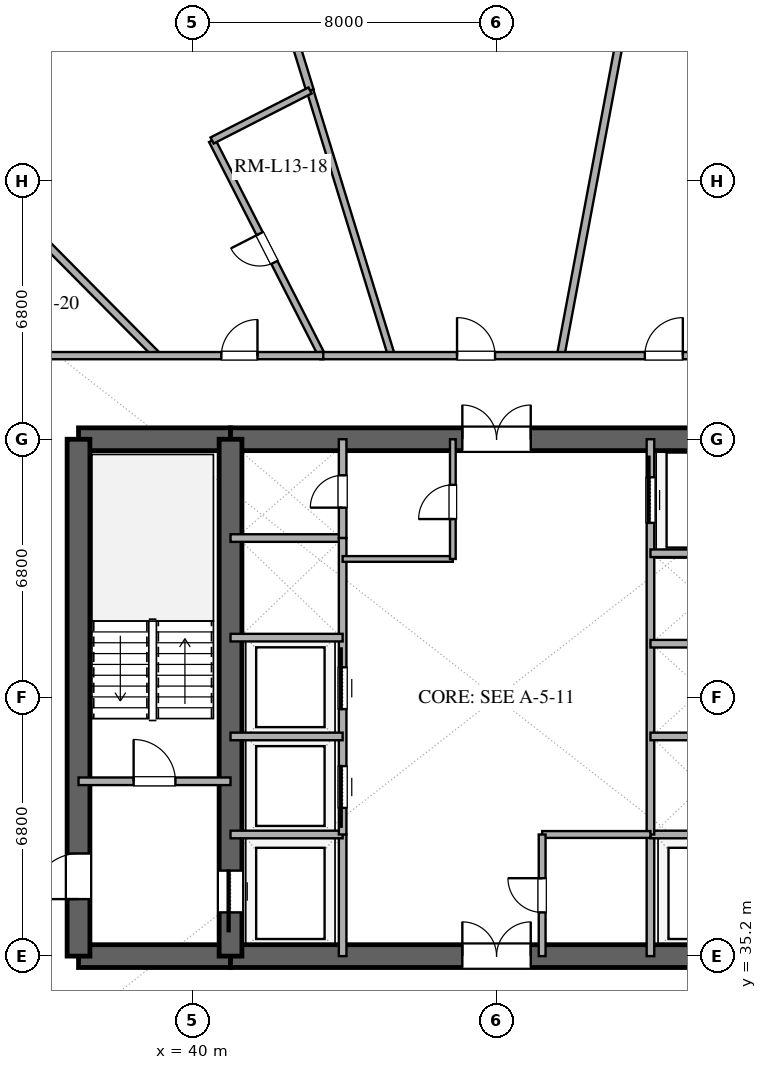
"""IFC4 building model, lengths in metres.
Left out: names, types, materials, properties, quantities, classifications, styles, units other than length and angle.
Written with IfcOpenShell. Run it as: python <this file> out.ifc"""

import sys

from ifc_helpers import new_model, si_unit, direction, frame, frame_2d, origin, place, context, subcontext, project, spatial, rectangle, extrude, element, fill, save


model = new_model("IFC4")
c1 = context("Model", 3, precision=1e-05, world=origin(), true_north=direction((0.0, 1.0)))
c2 = subcontext(c1, "Body", "Model", "MODEL_VIEW")
j1 = project(units=[si_unit("LENGTHUNIT", "METRE"), si_unit("PLANEANGLEUNIT", "RADIAN")], contexts=[c1])
p1 = place(None, origin())
s1 = spatial("IfcSite", under=j1, at=p1, CompositionType="ELEMENT")
p2 = place(p1, origin())
s2 = spatial("IfcBuilding", under=s1, at=p2, CompositionType="ELEMENT")
p3 = place(p2, frame((0.0, 0.0, 57.0)))
s3 = spatial("IfcBuildingStorey", under=s2, at=p3, CompositionType="ELEMENT", Elevation=57.0)
p4 = place(p3, frame((37.0, 35.2, 0.0), z_axis=(0.0, 0.0, 1.0), x_axis=(1.0, 0.0, 0.0)))
e1 = element("IfcWall", 1, at=p4, inside=s3, PredefinedType="SHEAR", context=c2, shape_type="SweptSolid", body=[
    extrude(rectangle(XDim=4.0, YDim=0.6, at=frame_2d((2.0, 0.0))), origin(), (0.0, 0.0, 1.0), 3.38),
])
p5 = place(p3, frame((41.0, 35.2, 0.0), z_axis=(0.0, 0.0, 1.0), x_axis=(1.0, 0.0, 0.0)))
e2 = element("IfcWall", 2, at=p5, inside=s3, PredefinedType="SHEAR", context=c2, shape_type="SweptSolid", body=[
    extrude(rectangle(XDim=14.0, YDim=0.6, at=frame_2d((7.0, 0.0))), origin(), (0.0, 0.0, 1.0), 3.38),
])
p6 = place(p5, frame((6.1, 0.0, 0.0)))
e3 = element("IfcOpeningElement", 3, at=p6, cuts=e2, PredefinedType="OPENING", context=c2, shape_type="SweptSolid", body=[
    extrude(rectangle(XDim=1.8, YDim=2.25, at=frame_2d((0.9, 1.125))), frame((0.0, 0.31, 0.0), z_axis=(0.0, -1.0, 0.0), x_axis=(1.0, 0.0, 0.0)), (0.0, 0.0, 1.0), 0.62),
])
p7 = place(p3, frame((37.0, 48.8, 0.0), z_axis=(0.0, 0.0, 1.0), x_axis=(1.0, 0.0, 0.0)))
e4 = element("IfcWall", 4, at=p7, inside=s3, PredefinedType="SHEAR", context=c2, shape_type="SweptSolid", body=[
    extrude(rectangle(XDim=4.0, YDim=0.6, at=frame_2d((2.0, 0.0))), origin(), (0.0, 0.0, 1.0), 3.38),
])
p8 = place(p3, frame((41.0, 48.8, 0.0), z_axis=(0.0, 0.0, 1.0), x_axis=(1.0, 0.0, 0.0)))
e5 = element("IfcWall", 5, at=p8, inside=s3, PredefinedType="SHEAR", context=c2, shape_type="SweptSolid", body=[
    extrude(rectangle(XDim=14.0, YDim=0.6, at=frame_2d((7.0, 0.0))), origin(), (0.0, 0.0, 1.0), 3.38),
])
p9 = place(p8, frame((6.1, 0.0, 0.0)))
e6 = element("IfcOpeningElement", 6, at=p9, cuts=e5, PredefinedType="OPENING", context=c2, shape_type="SweptSolid", body=[
    extrude(rectangle(XDim=1.8, YDim=2.25, at=frame_2d((0.9, 1.125))), frame((0.0, 0.31, 0.0), z_axis=(0.0, -1.0, 0.0), x_axis=(1.0, 0.0, 0.0)), (0.0, 0.0, 1.0), 0.62),
])
p10 = place(p3, frame((37.0, 35.2, 0.0), z_axis=(0.0, 0.0, 1.0), x_axis=(0.0, 1.0, 0.0)))
e7 = element("IfcWall", 7, at=p10, inside=s3, PredefinedType="SHEAR", context=c2, shape_type="SweptSolid", body=[
    extrude(rectangle(XDim=13.6, YDim=0.6, at=frame_2d((6.8, 0.0))), origin(), (0.0, 0.0, 1.0), 3.38),
])
p11 = place(p10, frame((1.5, 0.0, 0.0)))
e8 = element("IfcOpeningElement", 8, at=p11, cuts=e7, PredefinedType="OPENING", context=c2, shape_type="SweptSolid", body=[
    extrude(rectangle(XDim=1.2, YDim=2.15, at=frame_2d((0.6, 1.075))), frame((0.0, 0.31, 0.0), z_axis=(0.0, -1.0, 0.0), x_axis=(1.0, 0.0, 0.0)), (0.0, 0.0, 1.0), 0.62),
])
p12 = place(p3, frame((41.0, 35.2, 0.0), z_axis=(0.0, 0.0, 1.0), x_axis=(0.0, 1.0, 0.0)))
e9 = element("IfcWall", 9, at=p12, inside=s3, PredefinedType="SHEAR", context=c2, shape_type="SweptSolid", body=[
    extrude(rectangle(XDim=13.6, YDim=0.6, at=frame_2d((6.8, 0.0))), origin(), (0.0, 0.0, 1.0), 3.38),
])
p13 = place(p12, frame((1.15, 0.0, 0.0)))
e10 = element("IfcOpeningElement", 10, at=p13, cuts=e9, PredefinedType="OPENING", context=c2, shape_type="SweptSolid", body=[
    extrude(rectangle(XDim=1.1, YDim=2.2, at=frame_2d((0.55, 1.1))), frame((0.0, 0.31, 0.0), z_axis=(0.0, -1.0, 0.0), x_axis=(1.0, 0.0, 0.0)), (0.0, 0.0, 1.0), 0.62),
])
p14 = place(p3, frame((37.0, 39.8, 0.0), z_axis=(0.0, 0.0, 1.0), x_axis=(1.0, 0.0, 0.0)))
e11 = element("IfcWall", 11, at=p14, inside=s3, PredefinedType="SOLIDWALL", context=c2, shape_type="SweptSolid", body=[
    extrude(rectangle(XDim=4.0, YDim=0.2, at=frame_2d((2.0, 0.0))), origin(), (0.0, 0.0, 1.0), 2.74),
])
p15 = place(p14, frame((1.45, 0.0, 0.0)))
e12 = element("IfcOpeningElement", 12, at=p15, cuts=e11, PredefinedType="OPENING", context=c2, shape_type="SweptSolid", body=[
    extrude(rectangle(XDim=1.1, YDim=2.15, at=frame_2d((0.55, 1.075))), frame((0.0, 0.11, 0.0), z_axis=(0.0, -1.0, 0.0), x_axis=(1.0, 0.0, 0.0)), (0.0, 0.0, 1.0), 0.22),
])
p16 = place(p3, frame((43.95, 35.2, 0.0), z_axis=(0.0, 0.0, 1.0), x_axis=(0.0, 1.0, 0.0)))
e13 = element("IfcWall", 13, at=p16, inside=s3, PredefinedType="SOLIDWALL", context=c2, shape_type="SweptSolid", body=[
    extrude(rectangle(XDim=3.2, YDim=0.2, at=frame_2d((1.6, 0.0))), origin(), (0.0, 0.0, 1.0), 2.74),
])
p17 = place(p3, frame((41.0, 38.4, 0.0), z_axis=(0.0, 0.0, 1.0), x_axis=(1.0, 0.0, 0.0)))
e14 = element("IfcWall", 14, at=p17, inside=s3, PredefinedType="SOLIDWALL", context=c2, shape_type="SweptSolid", body=[
    extrude(rectangle(XDim=2.95, YDim=0.2, at=frame_2d((1.475, 0.0))), origin(), (0.0, 0.0, 1.0), 2.74),
])
p18 = place(p3, frame((52.05, 35.2, 0.0), z_axis=(0.0, 0.0, 1.0), x_axis=(0.0, 1.0, 0.0)))
e15 = element("IfcWall", 15, at=p18, inside=s3, PredefinedType="SOLIDWALL", context=c2, shape_type="SweptSolid", body=[
    extrude(rectangle(XDim=3.2, YDim=0.2, at=frame_2d((1.6, 0.0))), origin(), (0.0, 0.0, 1.0), 2.74),
])
for number, where, z_axis, x_axis in (
    (16, (52.05, 38.4, 0.0), (0.0, 0.0, 1.0), (1.0, 0.0, 0.0)),
    (17, (41.0, 46.2, 0.0), (0.0, 0.0, 1.0), (1.0, 0.0, 0.0)),
):
    element("IfcWall", number, at=place(p3, frame(where, z_axis=z_axis, x_axis=x_axis)), inside=s3, PredefinedType="SOLIDWALL", context=c2, shape_type="SweptSolid", body=[
        extrude(rectangle(XDim=2.95, YDim=0.2, at=frame_2d((1.475, 0.0))), origin(), (0.0, 0.0, 1.0), 2.74),
    ])
p19 = place(p3, frame((43.95, 46.2, 0.0), z_axis=(0.0, 0.0, 1.0), x_axis=(0.0, 1.0, 0.0)))
e18 = element("IfcWall", 18, at=p19, inside=s3, PredefinedType="SOLIDWALL", context=c2, shape_type="SweptSolid", body=[
    extrude(rectangle(XDim=2.6, YDim=0.2, at=frame_2d((1.3, 0.0))), origin(), (0.0, 0.0, 1.0), 2.74),
])
p20 = place(p19, frame((0.8, 0.0, 0.0)))
e19 = element("IfcOpeningElement", 19, at=p20, cuts=e18, PredefinedType="OPENING", context=c2, shape_type="SweptSolid", body=[
    extrude(rectangle(XDim=0.85, YDim=2.15, at=frame_2d((0.425, 1.075))), frame((0.0, 0.11, 0.0), z_axis=(0.0, -1.0, 0.0), x_axis=(1.0, 0.0, 0.0)), (0.0, 0.0, 1.0), 0.22),
])
p21 = place(p3, frame((43.95, 38.4, 0.0), z_axis=(0.0, 0.0, 1.0), x_axis=(0.0, 1.0, 0.0)))
e20 = element("IfcWall", 20, at=p21, inside=s3, PredefinedType="SOLIDWALL", context=c2, shape_type="SweptSolid", body=[
    extrude(rectangle(XDim=7.8, YDim=0.2, at=frame_2d((3.9, 0.0))), origin(), (0.0, 0.0, 1.0), 2.74),
])
p22 = place(p21, frame((0.7, 0.0, 0.0)))
e21 = element("IfcOpeningElement", 21, at=p22, cuts=e20, PredefinedType="OPENING", context=c2, shape_type="SweptSolid", body=[
    extrude(rectangle(XDim=1.1, YDim=2.2, at=frame_2d((0.55, 1.1))), frame((0.0, 0.11, 0.0), z_axis=(0.0, -1.0, 0.0), x_axis=(1.0, 0.0, 0.0)), (0.0, 0.0, 1.0), 0.22),
])
p23 = place(p21, frame((3.3, 0.0, 0.0)))
e22 = element("IfcOpeningElement", 22, at=p23, cuts=e20, PredefinedType="OPENING", context=c2, shape_type="SweptSolid", body=[
    extrude(rectangle(XDim=1.1, YDim=2.2, at=frame_2d((0.55, 1.1))), frame((0.0, 0.11, 0.0), z_axis=(0.0, -1.0, 0.0), x_axis=(1.0, 0.0, 0.0)), (0.0, 0.0, 1.0), 0.22),
])
for number, where, z_axis, x_axis in (
    (23, (41.0, 40.98, 0.0), (0.0, 0.0, 1.0), (1.0, 0.0, 0.0)),
    (24, (41.0, 43.58, 0.0), (0.0, 0.0, 1.0), (1.0, 0.0, 0.0)),
):
    element("IfcWall", number, at=place(p3, frame(where, z_axis=z_axis, x_axis=x_axis)), inside=s3, PredefinedType="SOLIDWALL", context=c2, shape_type="SweptSolid", body=[
        extrude(rectangle(XDim=2.95, YDim=0.2, at=frame_2d((1.475, 0.0))), origin(), (0.0, 0.0, 1.0), 2.74),
    ])
p24 = place(p3, frame((52.05, 38.4, 0.0), z_axis=(0.0, 0.0, 1.0), x_axis=(0.0, 1.0, 0.0)))
e25 = element("IfcWall", 25, at=p24, inside=s3, PredefinedType="SOLIDWALL", context=c2, shape_type="SweptSolid", body=[
    extrude(rectangle(XDim=10.4, YDim=0.2, at=frame_2d((5.2, 0.0))), origin(), (0.0, 0.0, 1.0), 2.74),
])
p25 = place(p24, frame((8.2, 0.0, 0.0)))
e26 = element("IfcOpeningElement", 26, at=p25, cuts=e25, PredefinedType="OPENING", context=c2, shape_type="SweptSolid", body=[
    extrude(rectangle(XDim=1.2, YDim=2.2, at=frame_2d((0.6, 1.1))), frame((0.0, 0.11, 0.0), z_axis=(0.0, -1.0, 0.0), x_axis=(1.0, 0.0, 0.0)), (0.0, 0.0, 1.0), 0.22),
])
for number, where, z_axis, x_axis in (
    (27, (52.05, 40.98, 0.0), (0.0, 0.0, 1.0), (1.0, 0.0, 0.0)),
    (28, (52.05, 43.42, 0.0), (0.0, 0.0, 1.0), (1.0, 0.0, 0.0)),
    (29, (52.05, 45.8, 0.0), (0.0, 0.0, 1.0), (1.0, 0.0, 0.0)),
):
    element("IfcWall", number, at=place(p3, frame(where, z_axis=z_axis, x_axis=x_axis)), inside=s3, PredefinedType="SOLIDWALL", context=c2, shape_type="SweptSolid", body=[
        extrude(rectangle(XDim=2.95, YDim=0.2, at=frame_2d((1.475, 0.0))), origin(), (0.0, 0.0, 1.0), 2.74),
    ])
p26 = place(p3, frame((43.95, 45.65, 0.0), z_axis=(0.0, 0.0, 1.0), x_axis=(1.0, 0.0, 0.0)))
e30 = element("IfcWall", 30, at=p26, inside=s3, PredefinedType="PARTITIONING", context=c2, shape_type="SweptSolid", body=[
    extrude(rectangle(XDim=2.9, YDim=0.15, at=frame_2d((1.45, 0.0))), origin(), (0.0, 0.0, 1.0), 2.74),
])
p27 = place(p3, frame((46.85, 45.65, 0.0), z_axis=(0.0, 0.0, 1.0), x_axis=(0.0, 1.0, 0.0)))
e31 = element("IfcWall", 31, at=p27, inside=s3, PredefinedType="PARTITIONING", context=c2, shape_type="SweptSolid", body=[
    extrude(rectangle(XDim=3.15, YDim=0.15, at=frame_2d((1.575, 0.0))), origin(), (0.0, 0.0, 1.0), 2.74),
])
p28 = place(p27, frame((1.05, 0.0, 0.0)))
e32 = element("IfcOpeningElement", 32, at=p28, cuts=e31, PredefinedType="OPENING", context=c2, shape_type="SweptSolid", body=[
    extrude(rectangle(XDim=0.9, YDim=2.15, at=frame_2d((0.45, 1.075))), frame((0.0, 0.085, 0.0), z_axis=(0.0, -1.0, 0.0), x_axis=(1.0, 0.0, 0.0)), (0.0, 0.0, 1.0), 0.17),
])
p29 = place(p3, frame((49.2, 38.4, 0.0), z_axis=(0.0, 0.0, 1.0), x_axis=(1.0, 0.0, 0.0)))
e33 = element("IfcWall", 33, at=p29, inside=s3, PredefinedType="PLUMBINGWALL", context=c2, shape_type="SweptSolid", body=[
    extrude(rectangle(XDim=2.85, YDim=0.18, at=frame_2d((1.425, 0.0))), origin(), (0.0, 0.0, 1.0), 2.74),
])
p30 = place(p3, frame((49.2, 35.2, 0.0), z_axis=(0.0, 0.0, 1.0), x_axis=(0.0, 1.0, 0.0)))
e34 = element("IfcWall", 34, at=p30, inside=s3, PredefinedType="PLUMBINGWALL", context=c2, shape_type="SweptSolid", body=[
    extrude(rectangle(XDim=3.2, YDim=0.18, at=frame_2d((1.6, 0.0))), origin(), (0.0, 0.0, 1.0), 2.74),
])
p31 = place(p30, frame((1.15, 0.0, 0.0)))
e35 = element("IfcOpeningElement", 35, at=p31, cuts=e34, PredefinedType="OPENING", context=c2, shape_type="SweptSolid", body=[
    extrude(rectangle(XDim=0.9, YDim=2.1, at=frame_2d((0.45, 1.05))), frame((0.0, 0.1, 0.0), z_axis=(0.0, -1.0, 0.0), x_axis=(1.0, 0.0, 0.0)), (0.0, 0.0, 1.0), 0.2),
])
p32 = place(p3, frame((52.375, 65.343, 0.0), z_axis=(0.0, 0.0, 1.0), x_axis=(-0.184219844734, -0.982885063884, 0.0)))
e36 = element("IfcWall", 36, at=p32, inside=s3, PredefinedType="PARTITIONING", context=c2, shape_type="SweptSolid", body=[
    extrude(rectangle(XDim=14.593, YDim=0.2, at=frame_2d((7.296, 0.0))), origin(), (0.0, 0.0, 1.0), 2.74),
])
p33 = place(p3, frame((43.092, 57.976, 0.0), z_axis=(0.0, 0.0, 1.0), x_axis=(0.293648581073, -0.95591344317, 0.0)))
e37 = element("IfcWall", 37, at=p33, inside=s3, PredefinedType="PLUMBINGWALL", context=c2, shape_type="SweptSolid", body=[
    extrude(rectangle(XDim=7.298, YDim=0.18, at=frame_2d((3.649, 0.0))), origin(), (0.0, 0.0, 1.0), 2.74),
])
p34 = place(p3, frame((40.953, 64.939, 0.0), z_axis=(0.0, 0.0, 1.0), x_axis=(0.293635973675, -0.955917315966, 0.0)))
e38 = element("IfcWall", 38, at=p34, inside=s3, PredefinedType="PARTITIONING", context=c2, shape_type="SweptSolid", body=[
    extrude(rectangle(XDim=7.284, YDim=0.2, at=frame_2d((3.642, 0.0))), origin(), (0.0, 0.0, 1.0), 2.74),
])
p35 = place(p3, frame((39.072, 51.0, 0.0), z_axis=(0.0, 0.0, 1.0), x_axis=(-0.704257683765, 0.70994444491, 0.0)))
e39 = element("IfcWall", 39, at=p35, inside=s3, PredefinedType="PARTITIONING", context=c2, shape_type="SweptSolid", body=[
    extrude(rectangle(XDim=13.824, YDim=0.2, at=frame_2d((6.912, 0.0))), origin(), (0.0, 0.0, 1.0), 2.74),
])
p36 = place(p3, frame((43.405, 51.0, 0.0), z_axis=(0.0, 0.0, 1.0), x_axis=(-0.454680565764, 0.890654581259, 0.0)))
e40 = element("IfcWall", 40, at=p36, inside=s3, PredefinedType="PLUMBINGWALL", context=c2, shape_type="SweptSolid", body=[
    extrude(rectangle(XDim=6.356, YDim=0.18, at=frame_2d((3.178, 0.0))), origin(), (0.0, 0.0, 1.0), 2.74),
])
p37 = place(p36, frame((2.753, 0.0, 0.0)))
e41 = element("IfcOpeningElement", 41, at=p37, cuts=e40, PredefinedType="OPENING", context=c2, shape_type="SweptSolid", body=[
    extrude(rectangle(XDim=0.85, YDim=2.1, at=frame_2d((0.425, 1.05))), frame((0.0, 0.1, 0.0), z_axis=(0.0, -1.0, 0.0), x_axis=(1.0, 0.0, 0.0)), (0.0, 0.0, 1.0), 0.2),
])
p38 = place(p3, frame((43.369, 51.0, 0.0), z_axis=(0.0, 0.0, 1.0), x_axis=(1.0, 0.0, 0.0)))
e42 = element("IfcWall", 42, at=p38, inside=s3, PredefinedType="PARTITIONING", context=c2, shape_type="SweptSolid", body=[
    extrude(rectangle(XDim=17.831, YDim=0.19, at=frame_2d((8.916, 0.0))), origin(), (0.0, 0.0, 1.0), 2.74),
])
p39 = place(p38, frame((14.29, 0.0, 0.0)))
e43 = element("IfcOpeningElement", 43, at=p39, cuts=e42, PredefinedType="OPENING", context=c2, shape_type="SweptSolid", body=[
    extrude(rectangle(XDim=0.95, YDim=2.15, at=frame_2d((0.475, 1.075))), frame((0.0, 0.105, 0.0), z_axis=(0.0, -1.0, 0.0), x_axis=(1.0, 0.0, 0.0)), (0.0, 0.0, 1.0), 0.21),
])
p40 = place(p38, frame((8.533, 0.0, 0.0)))
e44 = element("IfcOpeningElement", 44, at=p40, cuts=e42, PredefinedType="OPENING", context=c2, shape_type="SweptSolid", body=[
    extrude(rectangle(XDim=1.0, YDim=2.2, at=frame_2d((0.5, 1.1))), frame((0.0, 0.105, 0.0), z_axis=(0.0, -1.0, 0.0), x_axis=(1.0, 0.0, 0.0)), (0.0, 0.0, 1.0), 0.21),
])
p41 = place(p38, frame((3.591, 0.0, 0.0)))
e45 = element("IfcOpeningElement", 45, at=p41, cuts=e42, PredefinedType="OPENING", context=c2, shape_type="SweptSolid", body=[
    extrude(rectangle(XDim=1.0, YDim=2.2, at=frame_2d((0.5, 1.1))), frame((0.0, 0.105, 0.0), z_axis=(0.0, -1.0, 0.0), x_axis=(1.0, 0.0, 0.0)), (0.0, 0.0, 1.0), 0.21),
])
p42 = place(p3, frame((34.8, 51.0, 0.0), z_axis=(0.0, 0.0, 1.0), x_axis=(1.0, 0.0, 0.0)))
e46 = element("IfcWall", 46, at=p42, inside=s3, PredefinedType="PARTITIONING", context=c2, shape_type="SweptSolid", body=[
    extrude(rectangle(XDim=8.641, YDim=0.19, at=frame_2d((4.32, 0.0))), origin(), (0.0, 0.0, 1.0), 2.74),
])
p43 = place(p42, frame((5.959, 0.0, 0.0)))
e47 = element("IfcOpeningElement", 47, at=p43, cuts=e46, PredefinedType="OPENING", context=c2, shape_type="SweptSolid", body=[
    extrude(rectangle(XDim=0.95, YDim=2.15, at=frame_2d((0.475, 1.075))), frame((0.0, 0.105, 0.0), z_axis=(0.0, -1.0, 0.0), x_axis=(1.0, 0.0, 0.0)), (0.0, 0.0, 1.0), 0.21),
])
p44 = place(p3, frame((40.515, 56.661, 0.0), z_axis=(0.0, 0.0, 1.0), x_axis=(0.890666340124, 0.454657531083, 0.0)))
e48 = element("IfcWall", 48, at=p44, inside=s3, PredefinedType="PLUMBINGWALL", context=c2, shape_type="SweptSolid", body=[
    extrude(rectangle(XDim=2.893, YDim=0.18, at=frame_2d((1.447, 0.0))), origin(), (0.0, 0.0, 1.0), 2.74),
])
p45 = place(p13, origin())
e49 = element("IfcDoor", 49, at=p45, inside=s3, OperationType="SLIDING_TO_LEFT", PredefinedType="DOOR", context=c2, shape_type="SweptSolid", body=[
    extrude(rectangle(XDim=1.1, YDim=2.2, at=frame_2d((0.55, 1.1))), frame((0.0, 0.025, 0.0), z_axis=(0.0, -1.0, 0.0), x_axis=(1.0, 0.0, 0.0)), (0.0, 0.0, 1.0), 0.05),
])
fill(e10, e49)
p46 = place(p11, origin())
e50 = element("IfcDoor", 50, at=p46, inside=s3, OperationType="SINGLE_SWING_LEFT", PredefinedType="DOOR", context=c2, shape_type="SweptSolid", body=[
    extrude(rectangle(XDim=1.2, YDim=2.15, at=frame_2d((0.6, 1.075))), frame((0.0, 0.025, 0.0), z_axis=(0.0, -1.0, 0.0), x_axis=(1.0, 0.0, 0.0)), (0.0, 0.0, 1.0), 0.05),
])
fill(e8, e50)
p47 = place(p6, origin())
e51 = element("IfcDoor", 51, at=p47, inside=s3, OperationType="DOUBLE_DOOR_SINGLE_SWING", PredefinedType="DOOR", context=c2, shape_type="SweptSolid", body=[
    extrude(rectangle(XDim=1.8, YDim=2.25, at=frame_2d((0.9, 1.125))), frame((0.0, 0.025, 0.0), z_axis=(0.0, -1.0, 0.0), x_axis=(1.0, 0.0, 0.0)), (0.0, 0.0, 1.0), 0.05),
])
fill(e3, e51)
p48 = place(p9, origin())
e52 = element("IfcDoor", 52, at=p48, inside=s3, OperationType="DOUBLE_DOOR_SINGLE_SWING", PredefinedType="DOOR", context=c2, shape_type="SweptSolid", body=[
    extrude(rectangle(XDim=1.8, YDim=2.25, at=frame_2d((0.9, 1.125))), frame((0.0, 0.025, 0.0), z_axis=(0.0, -1.0, 0.0), x_axis=(1.0, 0.0, 0.0)), (0.0, 0.0, 1.0), 0.05),
])
fill(e6, e52)
p49 = place(p15, origin())
e53 = element("IfcDoor", 53, at=p49, inside=s3, OperationType="SINGLE_SWING_LEFT", PredefinedType="DOOR", context=c2, shape_type="SweptSolid", body=[
    extrude(rectangle(XDim=1.1, YDim=2.15, at=frame_2d((0.55, 1.075))), frame((0.0, 0.025, 0.0), z_axis=(0.0, -1.0, 0.0), x_axis=(1.0, 0.0, 0.0)), (0.0, 0.0, 1.0), 0.05),
])
fill(e12, e53)
p50 = place(p20, origin())
e54 = element("IfcDoor", 54, at=p50, inside=s3, OperationType="SINGLE_SWING_LEFT", PredefinedType="DOOR", context=c2, shape_type="SweptSolid", body=[
    extrude(rectangle(XDim=0.85, YDim=2.15, at=frame_2d((0.425, 1.075))), frame((0.0, 0.025, 0.0), z_axis=(0.0, -1.0, 0.0), x_axis=(1.0, 0.0, 0.0)), (0.0, 0.0, 1.0), 0.05),
])
fill(e19, e54)
p51 = place(p22, origin())
e55 = element("IfcDoor", 55, at=p51, inside=s3, OperationType="SLIDING_TO_LEFT", PredefinedType="DOOR", context=c2, shape_type="SweptSolid", body=[
    extrude(rectangle(XDim=1.1, YDim=2.2, at=frame_2d((0.55, 1.1))), frame((0.0, 0.025, 0.0), z_axis=(0.0, -1.0, 0.0), x_axis=(1.0, 0.0, 0.0)), (0.0, 0.0, 1.0), 0.05),
])
fill(e21, e55)
p52 = place(p23, origin())
e56 = element("IfcDoor", 56, at=p52, inside=s3, OperationType="SLIDING_TO_RIGHT", PredefinedType="DOOR", context=c2, shape_type="SweptSolid", body=[
    extrude(rectangle(XDim=1.1, YDim=2.2, at=frame_2d((0.55, 1.1))), frame((0.0, 0.025, 0.0), z_axis=(0.0, -1.0, 0.0), x_axis=(1.0, 0.0, 0.0)), (0.0, 0.0, 1.0), 0.05),
])
fill(e22, e56)
p53 = place(p25, origin())
e57 = element("IfcDoor", 57, at=p53, inside=s3, OperationType="SLIDING_TO_RIGHT", PredefinedType="DOOR", context=c2, shape_type="SweptSolid", body=[
    extrude(rectangle(XDim=1.2, YDim=2.2, at=frame_2d((0.6, 1.1))), frame((0.0, 0.025, 0.0), z_axis=(0.0, -1.0, 0.0), x_axis=(1.0, 0.0, 0.0)), (0.0, 0.0, 1.0), 0.05),
])
fill(e26, e57)
p54 = place(p28, origin())
e58 = element("IfcDoor", 58, at=p54, inside=s3, OperationType="SINGLE_SWING_LEFT", PredefinedType="DOOR", context=c2, shape_type="SweptSolid", body=[
    extrude(rectangle(XDim=0.9, YDim=2.15, at=frame_2d((0.45, 1.075))), frame((0.0, 0.025, 0.0), z_axis=(0.0, -1.0, 0.0), x_axis=(1.0, 0.0, 0.0)), (0.0, 0.0, 1.0), 0.05),
])
fill(e32, e58)
p55 = place(p31, origin())
e59 = element("IfcDoor", 59, at=p55, inside=s3, OperationType="SINGLE_SWING_RIGHT", PredefinedType="DOOR", context=c2, shape_type="SweptSolid", body=[
    extrude(rectangle(XDim=0.9, YDim=2.1, at=frame_2d((0.45, 1.05))), frame((0.0, 0.025, 0.0), z_axis=(0.0, -1.0, 0.0), x_axis=(1.0, 0.0, 0.0)), (0.0, 0.0, 1.0), 0.05),
])
fill(e35, e59)
p56 = place(p37, origin())
e60 = element("IfcDoor", 60, at=p56, inside=s3, OperationType="SINGLE_SWING_RIGHT", PredefinedType="DOOR", context=c2, shape_type="SweptSolid", body=[
    extrude(rectangle(XDim=0.85, YDim=2.1, at=frame_2d((0.425, 1.05))), frame((0.0, 0.025, 0.0), z_axis=(0.0, -1.0, 0.0), x_axis=(1.0, 0.0, 0.0)), (0.0, 0.0, 1.0), 0.05),
])
fill(e41, e60)
p57 = place(p40, origin())
e61 = element("IfcDoor", 61, at=p57, inside=s3, OperationType="SINGLE_SWING_RIGHT", PredefinedType="DOOR", context=c2, shape_type="SweptSolid", body=[
    extrude(rectangle(XDim=1.0, YDim=2.2, at=frame_2d((0.5, 1.1))), frame((0.0, 0.025, 0.0), z_axis=(0.0, -1.0, 0.0), x_axis=(1.0, 0.0, 0.0)), (0.0, 0.0, 1.0), 0.05),
])
fill(e44, e61)
p58 = place(p41, origin())
e62 = element("IfcDoor", 62, at=p58, inside=s3, OperationType="SINGLE_SWING_LEFT", PredefinedType="DOOR", context=c2, shape_type="SweptSolid", body=[
    extrude(rectangle(XDim=1.0, YDim=2.2, at=frame_2d((0.5, 1.1))), frame((0.0, 0.025, 0.0), z_axis=(0.0, -1.0, 0.0), x_axis=(1.0, 0.0, 0.0)), (0.0, 0.0, 1.0), 0.05),
])
fill(e45, e62)
p59 = place(p43, origin())
e63 = element("IfcDoor", 63, at=p59, inside=s3, OperationType="SINGLE_SWING_RIGHT", PredefinedType="DOOR", context=c2, shape_type="SweptSolid", body=[
    extrude(rectangle(XDim=0.95, YDim=2.15, at=frame_2d((0.475, 1.075))), frame((0.0, 0.025, 0.0), z_axis=(0.0, -1.0, 0.0), x_axis=(1.0, 0.0, 0.0)), (0.0, 0.0, 1.0), 0.05),
])
fill(e47, e63)
save(model, sys.argv[1])
